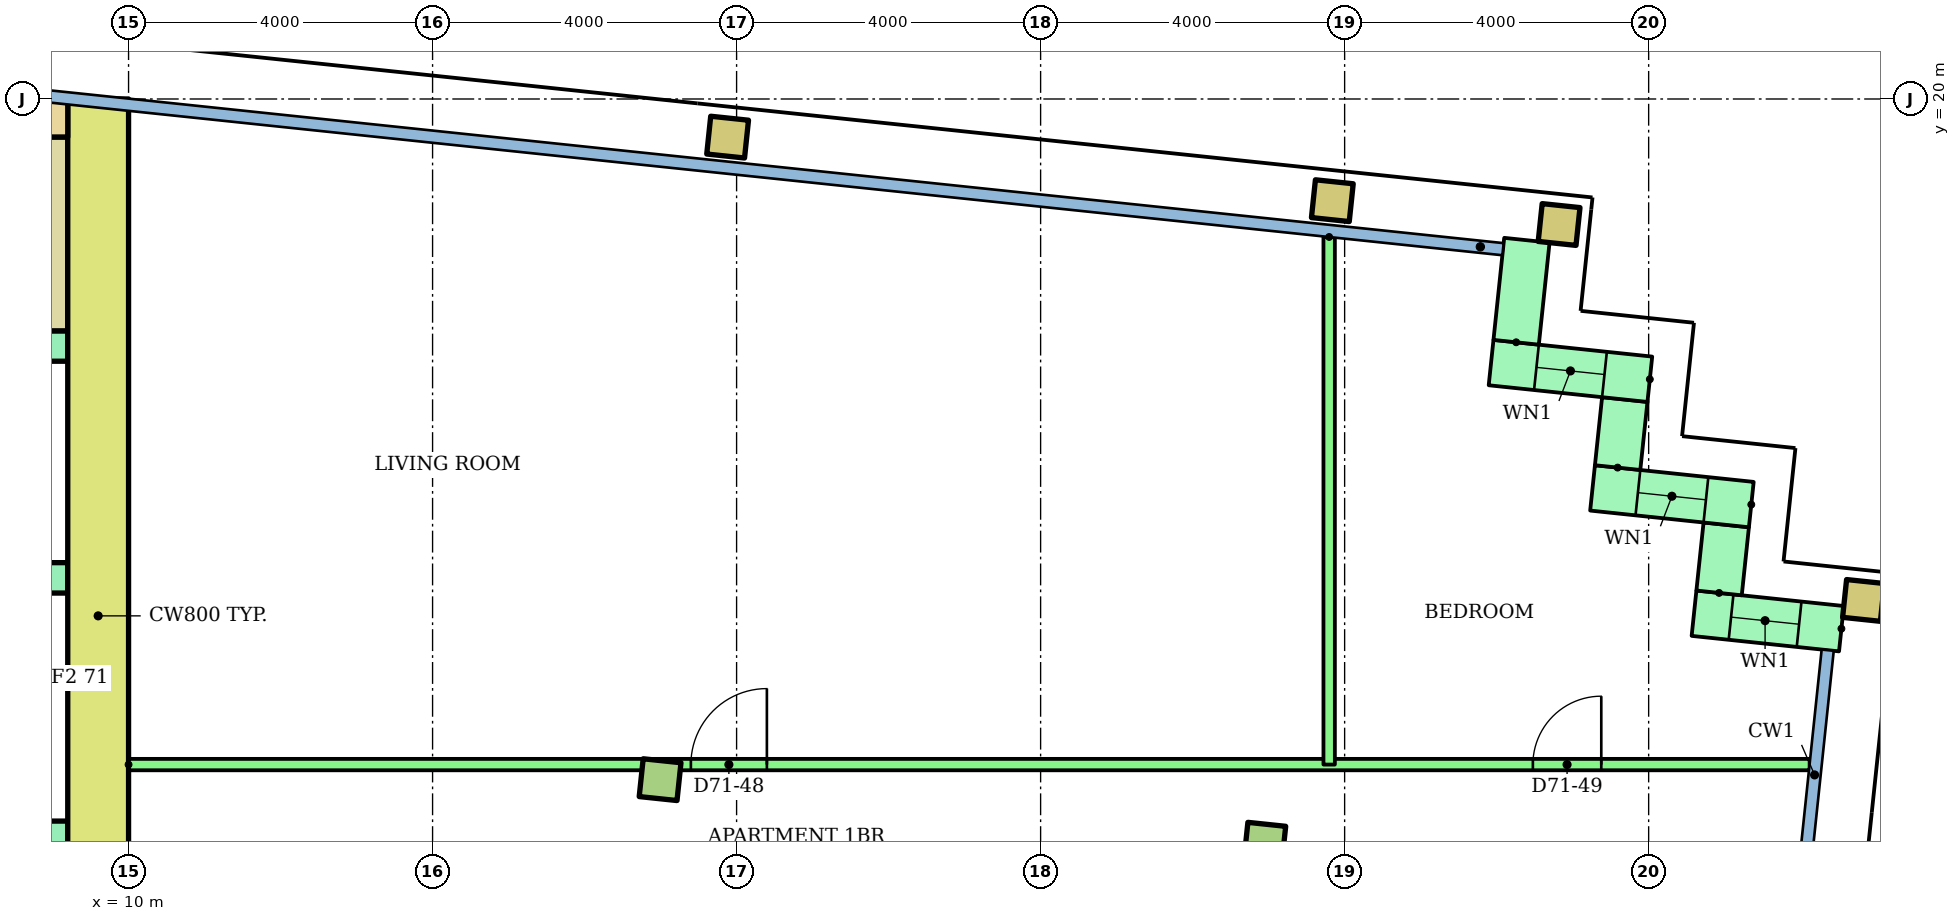
"""IFC4 building model, lengths in metres.
Left out: names, types, materials, properties, quantities, classifications, styles, units other than length and angle.
Written with IfcOpenShell. Run it as: python <this file> out.ifc"""

import sys

from ifc_helpers import new_model, si_unit, direction, frame, frame_2d, origin, origin_2d, place, context, subcontext, project, spatial, rectangle, hollow_rectangle, extrude, element, fill, save


model = new_model("IFC4")
c1 = context("Model", 3, precision=1e-05, world=origin(), true_north=direction((0.0, 1.0)))
c2 = subcontext(c1, "Body", "Model", "MODEL_VIEW")
j1 = project(units=[si_unit("LENGTHUNIT", "METRE"), si_unit("PLANEANGLEUNIT", "RADIAN")], contexts=[c1])
p1 = place(None, origin())
s1 = spatial("IfcSite", under=j1, at=p1, CompositionType="ELEMENT")
p2 = place(p1, origin())
s2 = spatial("IfcBuilding", under=s1, at=p2, CompositionType="ELEMENT")
p3 = place(p2, frame((0.0, 0.0, 272.3)))
s3 = spatial("IfcBuildingStorey", under=s2, at=p3, CompositionType="ELEMENT", Elevation=272.3)
for number, where, z_axis, x_axis in (
    (1, (16.993, 11.045, 0.0), (0.0, 0.0, 1.0), (0.995, -0.105, 0.0)),
    (2, (24.95, 10.209, 0.0), (0.0, 0.0, 1.0), (0.995, -0.105, 0.0)),
):
    element("IfcColumn", number, at=place(p3, frame(where, z_axis=z_axis, x_axis=x_axis)), inside=s3, PredefinedType="COLUMN", context=c2, shape_type="SweptSolid", body=[
        extrude(rectangle(XDim=0.5, YDim=0.5, at=origin_2d()), origin(), (0.0, 0.0, 1.0), 3.2),
    ])
for number, where, z_axis, x_axis in (
    (3, (32.827, 13.403, 0.0), (0.0, 0.0, 1.0), (0.995, -0.105, 0.0)),
    (4, (17.882, 19.498, 0.0), (0.0, 0.0, 1.0), (0.995, -0.105, 0.0)),
    (5, (25.838, 18.662, 0.0), (0.0, 0.0, 1.0), (0.995, -0.105, 0.0)),
    (6, (28.822, 18.349, 0.0), (0.0, 0.0, 1.0), (0.995, -0.105, 0.0)),
):
    element("IfcColumn", number, at=place(p3, frame(where, z_axis=z_axis, x_axis=x_axis)), inside=s3, PredefinedType="COLUMN", context=c2, shape_type="SweptSolid", body=[
        extrude(hollow_rectangle(XDim=0.5, YDim=0.5, WallThickness=0.025, at=origin_2d()), origin(), (0.0, 0.0, 1.0), 3.2),
    ])
p4 = place(p3, frame((32.536, 13.031, 0.0), z_axis=(0.0, 0.0, 1.0), x_axis=(-0.994534226826, 0.104411070641, 0.0)))
e7 = element("IfcWall", 7, at=p4, inside=s3, PredefinedType="STANDARD", context=c2, shape_type="SweptSolid", body=[
    extrude(rectangle(XDim=1.95, YDim=0.6, at=frame_2d((0.975, 0.0))), origin(), (0.0, 0.0, 1.0), 2.92),
])
p5 = place(p4, frame((0.56, 0.0, 0.9)))
e8 = element("IfcOpeningElement", 8, at=p5, cuts=e7, PredefinedType="OPENING", context=c2, shape_type="SweptSolid", body=[
    extrude(rectangle(XDim=0.9, YDim=1.5, at=frame_2d((0.45, 0.75))), frame((0.0, 0.31, 0.0), z_axis=(0.0, -1.0, 0.0), x_axis=(1.0, 0.0, 0.0)), (0.0, 0.0, 1.0), 0.62),
])
p6 = place(p3, frame((30.927, 13.502, 0.0), z_axis=(0.0, 0.0, 1.0), x_axis=(0.104416541099, 0.994533652495, 0.0)))
e9 = element("IfcWall", 9, at=p6, inside=s3, PredefinedType="STANDARD", context=c2, shape_type="SweptSolid", body=[
    extrude(rectangle(XDim=0.9, YDim=0.6, at=frame_2d((0.45, 0.0))), origin(), (0.0, 0.0, 1.0), 2.92),
])
p7 = place(p3, frame((31.351, 14.664, 0.0), z_axis=(0.0, 0.0, 1.0), x_axis=(-0.994523910136, 0.104509292252, 0.0)))
e10 = element("IfcWall", 10, at=p7, inside=s3, PredefinedType="STANDARD", context=c2, shape_type="SweptSolid", body=[
    extrude(rectangle(XDim=2.1, YDim=0.6, at=frame_2d((1.05, 0.0))), origin(), (0.0, 0.0, 1.0), 2.92),
])
p8 = place(p7, frame((0.6, 0.0, 0.9)))
e11 = element("IfcOpeningElement", 11, at=p8, cuts=e10, PredefinedType="OPENING", context=c2, shape_type="SweptSolid", body=[
    extrude(rectangle(XDim=0.9, YDim=1.5, at=frame_2d((0.45, 0.75))), frame((0.0, 0.31, 0.0), z_axis=(0.0, -1.0, 0.0), x_axis=(1.0, 0.0, 0.0)), (0.0, 0.0, 1.0), 0.62),
])
p9 = place(p3, frame((29.592, 15.151, 0.0), z_axis=(0.0, 0.0, 1.0), x_axis=(0.104444712852, 0.994530694326, 0.0)))
e12 = element("IfcWall", 12, at=p9, inside=s3, PredefinedType="STANDARD", context=c2, shape_type="SweptSolid", body=[
    extrude(rectangle(XDim=0.9, YDim=0.6, at=frame_2d((0.45, 0.0))), origin(), (0.0, 0.0, 1.0), 2.92),
])
p10 = place(p3, frame((30.015, 16.312, 0.0), z_axis=(0.0, 0.0, 1.0), x_axis=(-0.994510548187, 0.104636368175, 0.0)))
e13 = element("IfcWall", 13, at=p10, inside=s3, PredefinedType="STANDARD", context=c2, shape_type="SweptSolid", body=[
    extrude(rectangle(XDim=2.1, YDim=0.6, at=frame_2d((1.05, 0.0))), origin(), (0.0, 0.0, 1.0), 2.92),
])
p11 = place(p10, frame((0.6, 0.0, 0.9)))
e14 = element("IfcOpeningElement", 14, at=p11, cuts=e13, PredefinedType="OPENING", context=c2, shape_type="SweptSolid", body=[
    extrude(rectangle(XDim=0.9, YDim=1.5, at=frame_2d((0.45, 0.75))), frame((0.0, 0.31, 0.0), z_axis=(0.0, -1.0, 0.0), x_axis=(1.0, 0.0, 0.0)), (0.0, 0.0, 1.0), 0.62),
])
p12 = place(p3, frame((28.257, 16.799, 0.0), z_axis=(0.0, 0.0, 1.0), x_axis=(0.104534153452, 0.994521297289, 0.0)))
e15 = element("IfcWall", 15, at=p12, inside=s3, PredefinedType="STANDARD", context=c2, shape_type="SweptSolid", body=[
    extrude(rectangle(XDim=1.35, YDim=0.6, at=frame_2d((0.675, 0.0))), origin(), (0.0, 0.0, 1.0), 2.92),
])
p13 = place(p3, frame((9.6, 6.4, 0.0), z_axis=(0.0, 0.0, 1.0), x_axis=(0.0, 1.0, 0.0)))
e16 = element("IfcWall", 16, at=p13, inside=s3, PredefinedType="SHEAR", context=c2, shape_type="SweptSolid", body=[
    extrude(rectangle(XDim=13.6, YDim=0.8, at=frame_2d((6.8, 0.0))), origin(), (0.0, 0.0, 1.0), 2.92),
])
p14 = place(p3, frame((-9.2, 19.75, 0.0)))
e17 = element("IfcWall", 17, at=p14, inside=s3, PredefinedType="SHEAR", context=c2, shape_type="SweptSolid", body=[
    extrude(rectangle(XDim=18.4, YDim=0.5, at=frame_2d((9.2, 0.0))), origin(), (0.0, 0.0, 1.0), 2.92),
])
p15 = place(p3, frame((1.2, 10.3, 0.0)))
e18 = element("IfcWall", 18, at=p15, inside=s3, PredefinedType="SHEAR", context=c2, shape_type="SweptSolid", body=[
    extrude(rectangle(XDim=8.0, YDim=0.4, at=frame_2d((4.0, 0.0))), origin(), (0.0, 0.0, 1.0), 2.92),
])
p16 = place(p15, frame((0.817, 0.0, 0.0)))
e19 = element("IfcOpeningElement", 19, at=p16, cuts=e18, PredefinedType="OPENING", context=c2, shape_type="SweptSolid", body=[
    extrude(rectangle(XDim=1.1, YDim=2.1, at=frame_2d((0.55, 1.05))), frame((0.0, 0.21, 0.0), z_axis=(0.0, -1.0, 0.0), x_axis=(1.0, 0.0, 0.0)), (0.0, 0.0, 1.0), 0.42),
])
p17 = place(p15, frame((3.55, 0.0, 0.0)))
e20 = element("IfcOpeningElement", 20, at=p17, cuts=e18, PredefinedType="OPENING", context=c2, shape_type="SweptSolid", body=[
    extrude(rectangle(XDim=1.1, YDim=2.1, at=frame_2d((0.55, 1.05))), frame((0.0, 0.21, 0.0), z_axis=(0.0, -1.0, 0.0), x_axis=(1.0, 0.0, 0.0)), (0.0, 0.0, 1.0), 0.42),
])
p18 = place(p15, frame((6.283, 0.0, 0.0)))
e21 = element("IfcOpeningElement", 21, at=p18, cuts=e18, PredefinedType="OPENING", context=c2, shape_type="SweptSolid", body=[
    extrude(rectangle(XDim=1.1, YDim=2.1, at=frame_2d((0.55, 1.05))), frame((0.0, 0.21, 0.0), z_axis=(0.0, -1.0, 0.0), x_axis=(1.0, 0.0, 0.0)), (0.0, 0.0, 1.0), 0.42),
])
p19 = place(p3, frame((1.2, 13.7, 0.0)))
e22 = element("IfcWall", 22, at=p19, inside=s3, PredefinedType="SHEAR", context=c2, shape_type="SweptSolid", body=[
    extrude(rectangle(XDim=8.0, YDim=0.4, at=frame_2d((4.0, 0.0))), origin(), (0.0, 0.0, 1.0), 2.92),
])
p20 = place(p3, frame((-9.2, 16.75, 0.0)))
e23 = element("IfcWall", 23, at=p20, inside=s3, PredefinedType="SHEAR", context=c2, shape_type="SweptSolid", body=[
    extrude(rectangle(XDim=18.4, YDim=0.4, at=frame_2d((9.2, 0.0))), origin(), (0.0, 0.0, 1.0), 2.92),
])
p21 = place(p20, frame((0.1, 0.0, 0.0)))
e24 = element("IfcOpeningElement", 24, at=p21, cuts=e23, PredefinedType="OPENING", context=c2, shape_type="SweptSolid", body=[
    extrude(rectangle(XDim=0.95, YDim=2.1, at=frame_2d((0.475, 1.05))), frame((0.0, 0.21, 0.0), z_axis=(0.0, -1.0, 0.0), x_axis=(1.0, 0.0, 0.0)), (0.0, 0.0, 1.0), 0.42),
])
p22 = place(p20, frame((6.1, 0.0, 0.0)))
e25 = element("IfcOpeningElement", 25, at=p22, cuts=e23, PredefinedType="OPENING", context=c2, shape_type="SweptSolid", body=[
    extrude(rectangle(XDim=0.95, YDim=2.1, at=frame_2d((0.475, 1.05))), frame((0.0, 0.21, 0.0), z_axis=(0.0, -1.0, 0.0), x_axis=(1.0, 0.0, 0.0)), (0.0, 0.0, 1.0), 0.42),
])
p23 = place(p20, frame((12.1, 0.0, 0.0)))
e26 = element("IfcOpeningElement", 26, at=p23, cuts=e23, PredefinedType="OPENING", context=c2, shape_type="SweptSolid", body=[
    extrude(rectangle(XDim=0.95, YDim=2.1, at=frame_2d((0.475, 1.05))), frame((0.0, 0.21, 0.0), z_axis=(0.0, -1.0, 0.0), x_axis=(1.0, 0.0, 0.0)), (0.0, 0.0, 1.0), 0.42),
])
p24 = place(p3, frame((8.75, 16.95, 0.0), z_axis=(0.0, 0.0, 1.0), x_axis=(0.0, 1.0, 0.0)))
e27 = element("IfcWall", 27, at=p24, inside=s3, PredefinedType="SHEAR", context=c2, shape_type="SweptSolid", body=[
    extrude(rectangle(XDim=2.55, YDim=0.9, at=frame_2d((1.275, 0.0))), origin(), (0.0, 0.0, 1.0), 2.92),
])
p25 = place(p3, frame((10.0, 11.243, 0.0)))
e28 = element("IfcWall", 28, at=p25, inside=s3, PredefinedType="PARTITIONING", context=c2, shape_type="SweptSolid", body=[
    extrude(rectangle(XDim=22.118, YDim=0.15, at=frame_2d((11.059, 0.0))), origin(), (0.0, 0.0, 1.0), 2.4),
])
p26 = place(p25, frame((7.398, 0.0, 0.0)))
e29 = element("IfcOpeningElement", 29, at=p26, cuts=e28, PredefinedType="OPENING", context=c2, shape_type="SweptSolid", body=[
    extrude(rectangle(XDim=1.0, YDim=2.1, at=frame_2d((0.5, 1.05))), frame((0.0, 0.085, 0.0), z_axis=(0.0, -1.0, 0.0), x_axis=(1.0, 0.0, 0.0)), (0.0, 0.0, 1.0), 0.17),
])
p27 = place(p25, frame((18.477, 0.0, 0.0)))
e30 = element("IfcOpeningElement", 30, at=p27, cuts=e28, PredefinedType="OPENING", context=c2, shape_type="SweptSolid", body=[
    extrude(rectangle(XDim=0.9, YDim=2.1, at=frame_2d((0.45, 1.05))), frame((0.0, 0.085, 0.0), z_axis=(0.0, -1.0, 0.0), x_axis=(1.0, 0.0, 0.0)), (0.0, 0.0, 1.0), 0.17),
])
p28 = place(p3, frame((25.796, 18.185, 0.0), z_axis=(0.0, 0.0, 1.0), x_axis=(0.0, -1.0, 0.0)))
e31 = element("IfcWall", 31, at=p28, inside=s3, PredefinedType="PARTITIONING", context=c2, shape_type="SweptSolid", body=[
    extrude(rectangle(XDim=6.941, YDim=0.15, at=frame_2d((3.471, 0.0))), origin(), (0.0, 0.0, 1.0), 2.4),
])
p29 = place(p5, origin())
e32 = element("IfcWindow", 32, at=p29, inside=s3, PartitioningType="SINGLE_PANEL", PredefinedType="WINDOW", context=c2, shape_type="SweptSolid", body=[
    extrude(rectangle(XDim=0.9, YDim=1.5, at=frame_2d((0.45, 0.75))), frame((0.0, 0.03, 0.0), z_axis=(0.0, -1.0, 0.0), x_axis=(1.0, 0.0, 0.0)), (0.0, 0.0, 1.0), 0.06),
])
fill(e8, e32)
p30 = place(p8, origin())
e33 = element("IfcWindow", 33, at=p30, inside=s3, PartitioningType="SINGLE_PANEL", PredefinedType="WINDOW", context=c2, shape_type="SweptSolid", body=[
    extrude(rectangle(XDim=0.9, YDim=1.5, at=frame_2d((0.45, 0.75))), frame((0.0, 0.03, 0.0), z_axis=(0.0, -1.0, 0.0), x_axis=(1.0, 0.0, 0.0)), (0.0, 0.0, 1.0), 0.06),
])
fill(e11, e33)
p31 = place(p11, origin())
e34 = element("IfcWindow", 34, at=p31, inside=s3, PartitioningType="SINGLE_PANEL", PredefinedType="WINDOW", context=c2, shape_type="SweptSolid", body=[
    extrude(rectangle(XDim=0.9, YDim=1.5, at=frame_2d((0.45, 0.75))), frame((0.0, 0.03, 0.0), z_axis=(0.0, -1.0, 0.0), x_axis=(1.0, 0.0, 0.0)), (0.0, 0.0, 1.0), 0.06),
])
fill(e14, e34)
p32 = place(p26, origin())
e35 = element("IfcDoor", 35, at=p32, inside=s3, OperationType="SINGLE_SWING_RIGHT", PredefinedType="DOOR", context=c2, shape_type="SweptSolid", body=[
    extrude(rectangle(XDim=1.0, YDim=2.1, at=frame_2d((0.5, 1.05))), frame((0.0, 0.025, 0.0), z_axis=(0.0, -1.0, 0.0), x_axis=(1.0, 0.0, 0.0)), (0.0, 0.0, 1.0), 0.05),
])
fill(e29, e35)
p33 = place(p27, origin())
e36 = element("IfcDoor", 36, at=p33, inside=s3, OperationType="SINGLE_SWING_RIGHT", PredefinedType="DOOR", context=c2, shape_type="SweptSolid", body=[
    extrude(rectangle(XDim=0.9, YDim=2.1, at=frame_2d((0.45, 1.05))), frame((0.0, 0.025, 0.0), z_axis=(0.0, -1.0, 0.0), x_axis=(1.0, 0.0, 0.0)), (0.0, 0.0, 1.0), 0.05),
])
fill(e30, e36)
save(model, sys.argv[1])
